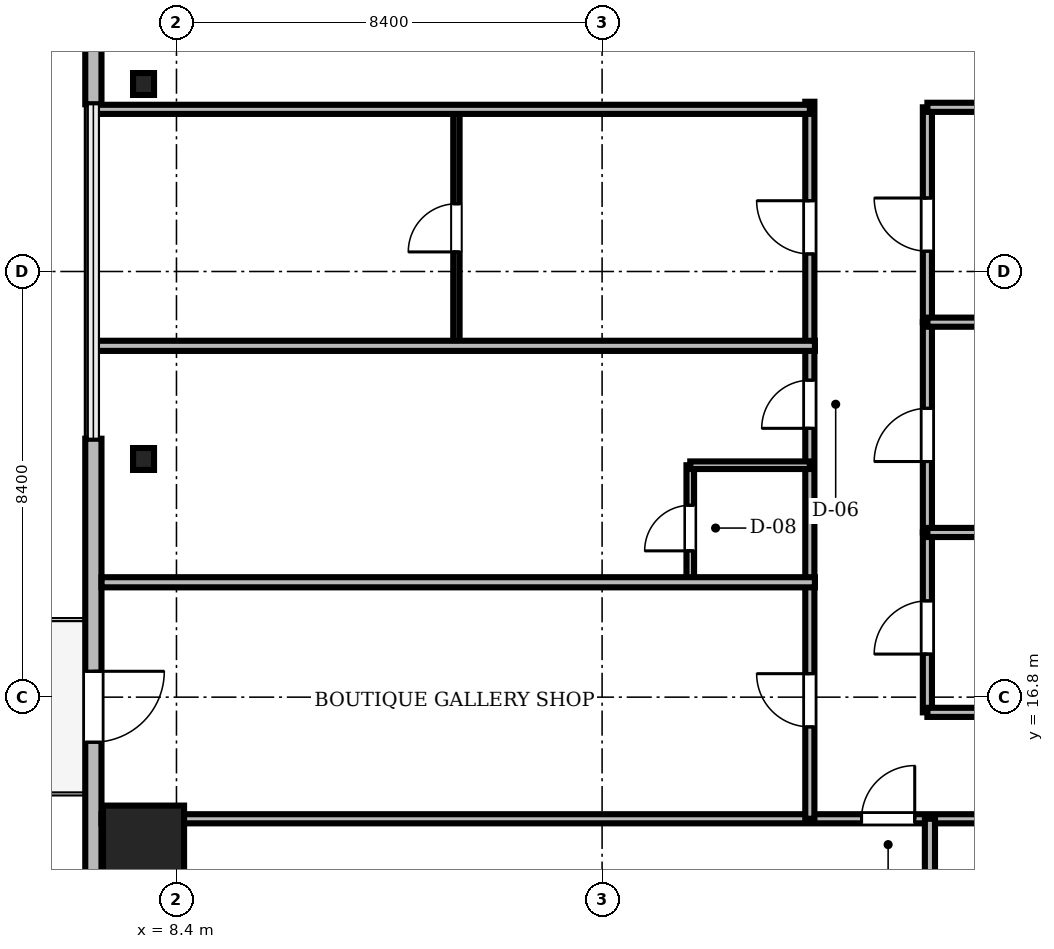
"""IFC4 building model, lengths in metres.
Left out: names, types, materials, properties, quantities, classifications, styles, units other than length and angle.
Written with IfcOpenShell. Run it as: python <this file> out.ifc"""

import sys

from ifc_helpers import new_model, si_unit, direction, frame, frame_2d, origin, origin_2d, place, context, subcontext, project, spatial, rectangle, i_section, extrude, source, transform, mapped, element, fill, save


model = new_model("IFC4")
c1 = context("Model", 3, precision=1e-05, world=origin(), true_north=direction((0.0, 1.0)))
c2 = subcontext(c1, "Body", "Model", "MODEL_VIEW")
j1 = project(units=[si_unit("LENGTHUNIT", "METRE"), si_unit("PLANEANGLEUNIT", "RADIAN")], contexts=[c1])
p1 = place(None, origin())
s1 = spatial("IfcSite", under=j1, at=p1, CompositionType="ELEMENT")
p2 = place(p1, origin())
s2 = spatial("IfcBuilding", under=s1, at=p2, CompositionType="ELEMENT")
p3 = place(p2, frame((0.0, 0.0, 137.2)))
s3 = spatial("IfcBuildingStorey", under=s2, at=p3, CompositionType="ELEMENT", Elevation=137.2)
m1 = source(origin(), c2, "Body", "SweptSolid", [
    extrude(rectangle(XDim=1.6, YDim=1.6, at=origin_2d()), origin(), (0.0, 0.0, 1.0), 3.46),
])
p4 = place(p3, frame((7.75, 13.86, 0.0), z_axis=(0.0, 0.0, 1.0), x_axis=(1.0, 0.0, 0.0)))
e1 = element("IfcColumn", 1, at=p4, inside=s3, PredefinedType="COLUMN", context=c2, shape_type="MappedRepresentation", body=[
    mapped(m1, transform((0.0, 0.0, 0.0), scale=1.0)),
])
m2 = source(origin(), c2, "Body", "SweptSolid", [
    extrude(i_section(OverallWidth=0.414, OverallDepth=0.432, WebThickness=0.026, FlangeThickness=0.04, FilletRadius=0.015, at=origin_2d()), origin(), (0.0, 0.0, 1.0), 3.46),
])
for number, where, z_axis, x_axis in (
    (2, (7.75, 28.9, 0.0), (0.0, 0.0, 1.0), (1.0, 0.0, 0.0)),
    (3, (7.75, 21.5, 0.0), (0.0, 0.0, 1.0), (1.0, 0.0, 0.0)),
):
    element("IfcColumn", number, at=place(p3, frame(where, z_axis=z_axis, x_axis=x_axis)), inside=s3, PredefinedType="COLUMN", context=c2, shape_type="MappedRepresentation", body=[
        mapped(m2, transform((0.0, 0.0, 0.0), scale=1.0)),
    ])
m3 = source(origin(), c2, "Body", "SweptSolid", [
    extrude(rectangle(XDim=15.6, YDim=0.32, at=frame_2d((7.8, 0.0))), origin(), (0.0, 0.0, 1.0), 3.46),
])
p5 = place(p3, frame((6.76, 44.1, 0.0), z_axis=(0.0, 0.0, 1.0), x_axis=(0.0, -1.0, 0.0)))
e4 = element("IfcWall", 4, at=p5, inside=s3, PredefinedType="SOLIDWALL", context=c2, shape_type="MappedRepresentation", body=[
    mapped(m3, transform((0.0, 0.0, 0.0), scale=1.0)),
])
m4 = source(origin(), c2, "Body", "SweptSolid", [
    extrude(rectangle(XDim=2.2, YDim=2.4, at=frame_2d((1.1, 1.2))), frame((0.0, 0.17, 0.0), z_axis=(0.0, -1.0, 0.0), x_axis=(1.0, 0.0, 0.0)), (0.0, 0.0, 1.0), 0.34),
])
p6 = place(p5, frame((3.005, 0.0, 0.72)))
e5 = element("IfcOpeningElement", 5, at=p6, cuts=e4, PredefinedType="OPENING", context=c2, shape_type="MappedRepresentation", body=[
    mapped(m4, transform((0.0, 0.0, 0.0), scale=1.0)),
])
m5 = source(origin(), c2, "Body", "SweptSolid", [
    extrude(rectangle(XDim=15.6, YDim=0.32, at=frame_2d((7.8, 0.0))), origin(), (0.0, 0.0, 1.0), 3.46),
])
p7 = place(p3, frame((6.76, 21.9, 0.0), z_axis=(0.0, 0.0, 1.0), x_axis=(0.0, -1.0, 0.0)))
e6 = element("IfcWall", 6, at=p7, inside=s3, PredefinedType="SOLIDWALL", context=c2, shape_type="MappedRepresentation", body=[
    mapped(m5, transform((0.0, 0.0, 0.0), scale=1.0)),
])
m6 = source(origin(), c2, "Body", "SweptSolid", [
    extrude(rectangle(XDim=1.4, YDim=2.3, at=frame_2d((0.7, 1.15))), frame((0.0, 0.17, 0.0), z_axis=(0.0, -1.0, 0.0), x_axis=(1.0, 0.0, 0.0)), (0.0, 0.0, 1.0), 0.34),
])
p8 = place(p7, frame((4.59, 0.0, 0.0)))
e7 = element("IfcOpeningElement", 7, at=p8, cuts=e6, PredefinedType="OPENING", context=c2, shape_type="MappedRepresentation", body=[
    mapped(m6, transform((0.0, 0.0, 0.0), scale=1.0)),
])
p9 = place(p7, frame((10.395, 0.0, 0.72)))
e8 = element("IfcOpeningElement", 8, at=p9, cuts=e6, PredefinedType="OPENING", context=c2, shape_type="MappedRepresentation", body=[
    mapped(m4, transform((0.0, 0.0, 0.0), scale=1.0)),
])
m7 = source(origin(), c2, "Body", "SweptSolid", [
    extrude(rectangle(XDim=46.156, YDim=0.18, at=frame_2d((23.078, 0.0))), origin(), (0.0, 0.0, 1.0), 2.702),
])
p10 = place(p3, frame((6.922, 14.4, 0.0), z_axis=(0.0, 0.0, 1.0), x_axis=(1.0, 0.0, 0.0)))
e9 = element("IfcWall", 9, at=p10, inside=s3, PredefinedType="PARTITIONING", context=c2, shape_type="MappedRepresentation", body=[
    mapped(m7, transform((0.0, 0.0, 0.0), scale=1.0)),
])
m8 = source(origin(), c2, "Body", "SweptSolid", [
    extrude(rectangle(XDim=1.05, YDim=2.2, at=frame_2d((0.525, 1.1))), frame((0.0, 0.1, 0.0), z_axis=(0.0, -1.0, 0.0), x_axis=(1.0, 0.0, 0.0)), (0.0, 0.0, 1.0), 0.2),
])
p11 = place(p10, frame((14.998, 0.0, 0.0)))
e10 = element("IfcOpeningElement", 10, at=p11, cuts=e9, PredefinedType="OPENING", context=c2, shape_type="MappedRepresentation", body=[
    mapped(m8, transform((0.0, 0.0, 0.0), scale=1.0)),
])
p12 = place(p10, frame((17.553, 0.0, 0.0)))
e11 = element("IfcOpeningElement", 11, at=p12, cuts=e9, PredefinedType="OPENING", context=c2, shape_type="MappedRepresentation", body=[
    mapped(m8, transform((0.0, 0.0, 0.0), scale=1.0)),
])
p13 = place(p10, frame((21.003, 0.0, 0.0)))
e12 = element("IfcOpeningElement", 12, at=p13, cuts=e9, PredefinedType="OPENING", context=c2, shape_type="MappedRepresentation", body=[
    mapped(m8, transform((0.0, 0.0, 0.0), scale=1.0)),
])
p14 = place(p10, frame((24.532, 0.0, 0.0)))
e13 = element("IfcOpeningElement", 13, at=p14, cuts=e9, PredefinedType="OPENING", context=c2, shape_type="MappedRepresentation", body=[
    mapped(m8, transform((0.0, 0.0, 0.0), scale=1.0)),
])
p15 = place(p10, frame((29.342, 0.0, 0.0)))
e14 = element("IfcOpeningElement", 14, at=p15, cuts=e9, PredefinedType="OPENING", context=c2, shape_type="MappedRepresentation", body=[
    mapped(m8, transform((0.0, 0.0, 0.0), scale=1.0)),
])
p16 = place(p10, frame((34.073, 0.0, 0.0)))
e15 = element("IfcOpeningElement", 15, at=p16, cuts=e9, PredefinedType="OPENING", context=c2, shape_type="MappedRepresentation", body=[
    mapped(m8, transform((0.0, 0.0, 0.0), scale=1.0)),
])
p17 = place(p10, frame((37.822, 0.0, 0.0)))
e16 = element("IfcOpeningElement", 16, at=p17, cuts=e9, PredefinedType="OPENING", context=c2, shape_type="MappedRepresentation", body=[
    mapped(m8, transform((0.0, 0.0, 0.0), scale=1.0)),
])
p18 = place(p10, frame((41.828, 0.0, 0.0)))
e17 = element("IfcOpeningElement", 17, at=p18, cuts=e9, PredefinedType="OPENING", context=c2, shape_type="MappedRepresentation", body=[
    mapped(m8, transform((0.0, 0.0, 0.0), scale=1.0)),
])
m9 = source(origin(), c2, "Body", "SweptSolid", [
    extrude(rectangle(XDim=14.15, YDim=0.18, at=frame_2d((7.075, 0.0))), origin(), (0.0, 0.0, 1.0), 2.852),
])
p19 = place(p3, frame((20.9, 14.4, 0.0), z_axis=(0.0, 0.0, 1.0), x_axis=(0.0, 1.0, 0.0)))
e18 = element("IfcWall", 18, at=p19, inside=s3, PredefinedType="PARTITIONING", context=c2, shape_type="MappedRepresentation", body=[
    mapped(m9, transform((0.0, 0.0, 0.0), scale=1.0)),
])
p20 = place(p19, frame((1.813, 0.0, 0.0)))
e19 = element("IfcOpeningElement", 19, at=p20, cuts=e18, PredefinedType="OPENING", context=c2, shape_type="MappedRepresentation", body=[
    mapped(m8, transform((0.0, 0.0, 0.0), scale=1.0)),
])
m10 = source(origin(), c2, "Body", "SweptSolid", [
    extrude(rectangle(XDim=0.95, YDim=2.15, at=frame_2d((0.475, 1.075))), frame((0.0, 0.1, 0.0), z_axis=(0.0, -1.0, 0.0), x_axis=(1.0, 0.0, 0.0)), (0.0, 0.0, 1.0), 0.2),
])
p21 = place(p19, frame((7.705, 0.0, 0.0)))
e20 = element("IfcOpeningElement", 20, at=p21, cuts=e18, PredefinedType="OPENING", context=c2, shape_type="MappedRepresentation", body=[
    mapped(m10, transform((0.0, 0.0, 0.0), scale=1.0)),
])
p22 = place(p19, frame((11.146, 0.0, 0.0)))
e21 = element("IfcOpeningElement", 21, at=p22, cuts=e18, PredefinedType="OPENING", context=c2, shape_type="MappedRepresentation", body=[
    mapped(m8, transform((0.0, 0.0, 0.0), scale=1.0)),
])
m11 = source(origin(), c2, "Body", "SweptSolid", [
    extrude(rectangle(XDim=4.667, YDim=0.125, at=frame_2d((2.333, 0.0))), origin(), (0.0, 0.0, 1.0), 2.852),
])
p23 = place(p3, frame((13.925, 23.733, 0.0), z_axis=(0.0, 0.0, 1.0), x_axis=(0.0, 1.0, 0.0)))
e22 = element("IfcWall", 22, at=p23, inside=s3, PredefinedType="PARTITIONING", context=c2, shape_type="MappedRepresentation", body=[
    mapped(m11, transform((0.0, 0.0, 0.0), scale=1.0)),
])
m12 = source(origin(), c2, "Body", "SweptSolid", [
    extrude(rectangle(XDim=0.95, YDim=2.15, at=frame_2d((0.475, 1.075))), frame((0.0, 0.073, 0.0), z_axis=(0.0, -1.0, 0.0), x_axis=(1.0, 0.0, 0.0)), (0.0, 0.0, 1.0), 0.145),
])
p24 = place(p23, frame((1.853, 0.0, 0.0)))
e23 = element("IfcOpeningElement", 23, at=p24, cuts=e22, PredefinedType="OPENING", context=c2, shape_type="MappedRepresentation", body=[
    mapped(m12, transform((0.0, 0.0, 0.0), scale=1.0)),
])
m13 = source(origin(), c2, "Body", "SweptSolid", [
    extrude(rectangle(XDim=4.24, YDim=0.18, at=frame_2d((2.12, 0.0))), origin(), (0.0, 0.0, 1.0), 2.852),
])
p25 = place(p3, frame((23.22, 24.2, 0.0), z_axis=(0.0, 0.0, 1.0), x_axis=(0.0, 1.0, 0.0)))
e24 = element("IfcWall", 24, at=p25, inside=s3, PredefinedType="PARTITIONING", context=c2, shape_type="MappedRepresentation", body=[
    mapped(m13, transform((0.0, 0.0, 0.0), scale=1.0)),
])
p26 = place(p25, frame((1.4, 0.0, 0.0)))
e25 = element("IfcOpeningElement", 25, at=p26, cuts=e24, PredefinedType="OPENING", context=c2, shape_type="MappedRepresentation", body=[
    mapped(m8, transform((0.0, 0.0, 0.0), scale=1.0)),
])
m14 = source(origin(), c2, "Body", "SweptSolid", [
    extrude(rectangle(XDim=4.15, YDim=0.18, at=frame_2d((2.075, 0.0))), origin(), (0.0, 0.0, 1.0), 3.122),
])
p27 = place(p3, frame((23.22, 20.05, 0.0), z_axis=(0.0, 0.0, 1.0), x_axis=(0.0, 1.0, 0.0)))
e26 = element("IfcWall", 26, at=p27, inside=s3, PredefinedType="PARTITIONING", context=c2, shape_type="MappedRepresentation", body=[
    mapped(m14, transform((0.0, 0.0, 0.0), scale=1.0)),
])
p28 = place(p27, frame((1.4, 0.0, 0.0)))
e27 = element("IfcOpeningElement", 27, at=p28, cuts=e26, PredefinedType="OPENING", context=c2, shape_type="MappedRepresentation", body=[
    mapped(m8, transform((0.0, 0.0, 0.0), scale=1.0)),
])
m15 = source(origin(), c2, "Body", "SweptSolid", [
    extrude(rectangle(XDim=3.55, YDim=0.18, at=frame_2d((1.775, 0.0))), origin(), (0.0, 0.0, 1.0), 2.852),
])
p29 = place(p3, frame((23.22, 16.5, 0.0), z_axis=(0.0, 0.0, 1.0), x_axis=(0.0, 1.0, 0.0)))
e28 = element("IfcWall", 28, at=p29, inside=s3, PredefinedType="PARTITIONING", context=c2, shape_type="MappedRepresentation", body=[
    mapped(m15, transform((0.0, 0.0, 0.0), scale=1.0)),
])
p30 = place(p29, frame((1.15, 0.0, 0.0)))
e29 = element("IfcOpeningElement", 29, at=p30, cuts=e28, PredefinedType="OPENING", context=c2, shape_type="MappedRepresentation", body=[
    mapped(m8, transform((0.0, 0.0, 0.0), scale=1.0)),
])
m16 = source(origin(), c2, "Body", "SweptSolid", [
    extrude(rectangle(XDim=2.29, YDim=0.15, at=frame_2d((1.145, 0.0))), origin(), (0.0, 0.0, 1.0), 2.852),
])
p31 = place(p3, frame((18.54, 19.087, 0.0), z_axis=(0.0, 0.0, 1.0), x_axis=(0.0, 1.0, 0.0)))
e30 = element("IfcWall", 30, at=p31, inside=s3, PredefinedType="PARTITIONING", context=c2, shape_type="MappedRepresentation", body=[
    mapped(m16, transform((0.0, 0.0, 0.0), scale=1.0)),
])
m17 = source(origin(), c2, "Body", "SweptSolid", [
    extrude(rectangle(XDim=0.9, YDim=2.1, at=frame_2d((0.45, 1.05))), frame((0.0, 0.085, 0.0), z_axis=(0.0, -1.0, 0.0), x_axis=(1.0, 0.0, 0.0)), (0.0, 0.0, 1.0), 0.17),
])
p32 = place(p31, frame((0.6, 0.0, 0.0)))
e31 = element("IfcOpeningElement", 31, at=p32, cuts=e30, PredefinedType="OPENING", context=c2, shape_type="MappedRepresentation", body=[
    mapped(m17, transform((0.0, 0.0, 0.0), scale=1.0)),
])
m18 = source(origin(), c2, "Body", "SweptSolid", [
    extrude(rectangle(XDim=14.078, YDim=0.2, at=frame_2d((7.039, 0.0))), origin(), (0.0, 0.0, 1.0), 2.702),
])
p33 = place(p3, frame((6.922, 19.067, 0.0), z_axis=(0.0, 0.0, 1.0), x_axis=(1.0, 0.0, 0.0)))
e32 = element("IfcWall", 32, at=p33, inside=s3, PredefinedType="PARTITIONING", context=c2, shape_type="MappedRepresentation", body=[
    mapped(m18, transform((0.0, 0.0, 0.0), scale=1.0)),
])
m19 = source(origin(), c2, "Body", "SweptSolid", [
    extrude(rectangle(XDim=14.27, YDim=0.2, at=frame_2d((7.135, 0.0))), origin(), (0.0, 0.0, 1.0), 2.702),
])
p34 = place(p3, frame((6.73, 23.733, 0.0), z_axis=(0.0, 0.0, 1.0), x_axis=(1.0, 0.0, 0.0)))
e33 = element("IfcWall", 33, at=p34, inside=s3, PredefinedType="PARTITIONING", context=c2, shape_type="MappedRepresentation", body=[
    mapped(m19, transform((0.0, 0.0, 0.0), scale=1.0)),
])
m20 = source(origin(), c2, "Body", "SweptSolid", [
    extrude(rectangle(XDim=14.17, YDim=0.18, at=frame_2d((7.085, 0.0))), origin(), (0.0, 0.0, 1.0), 2.702),
])
p35 = place(p3, frame((6.73, 28.4, 0.0), z_axis=(0.0, 0.0, 1.0), x_axis=(1.0, 0.0, 0.0)))
e34 = element("IfcWall", 34, at=p35, inside=s3, PredefinedType="PARTITIONING", context=c2, shape_type="MappedRepresentation", body=[
    mapped(m20, transform((0.0, 0.0, 0.0), scale=1.0)),
])
m21 = source(origin(), c2, "Body", "SweptSolid", [
    extrude(rectangle(XDim=12.278, YDim=0.2, at=frame_2d((6.139, 0.0))), origin(), (0.0, 0.0, 1.0), 2.702),
])
p36 = place(p3, frame((23.27, 2.122, 0.0), z_axis=(0.0, 0.0, 1.0), x_axis=(0.0, 1.0, 0.0)))
e35 = element("IfcWall", 35, at=p36, inside=s3, PredefinedType="PARTITIONING", context=c2, shape_type="MappedRepresentation", body=[
    mapped(m21, transform((0.0, 0.0, 0.0), scale=1.0)),
])
m22 = source(origin(), c2, "Body", "SweptSolid", [
    extrude(rectangle(XDim=5.18, YDim=0.18, at=frame_2d((2.59, 0.0))), origin(), (0.0, 0.0, 1.0), 3.46),
])
for number, where, z_axis, x_axis in (
    (36, (23.22, 16.5, 0.0), (0.0, 0.0, 1.0), (1.0, 0.0, 0.0)),
    (37, (23.22, 20.05, 0.0), (0.0, 0.0, 1.0), (1.0, 0.0, 0.0)),
    (38, (23.22, 24.2, 0.0), (0.0, 0.0, 1.0), (1.0, 0.0, 0.0)),
    (39, (23.22, 28.44, 0.0), (0.0, 0.0, 1.0), (1.0, 0.0, 0.0)),
):
    element("IfcWall", number, at=place(p3, frame(where, z_axis=z_axis, x_axis=x_axis)), inside=s3, PredefinedType="PARTITIONING", context=c2, shape_type="MappedRepresentation", body=[
        mapped(m22, transform((0.0, 0.0, 0.0), scale=1.0)),
    ])
m23 = source(origin(), c2, "Body", "SweptSolid", [
    extrude(rectangle(XDim=2.36, YDim=0.15, at=frame_2d((1.18, 0.0))), origin(), (0.0, 0.0, 1.0), 3.46),
])
p37 = place(p3, frame((18.54, 21.377, 0.0), z_axis=(0.0, 0.0, 1.0), x_axis=(1.0, 0.0, 0.0)))
e40 = element("IfcWall", 40, at=p37, inside=s3, PredefinedType="PARTITIONING", context=c2, shape_type="MappedRepresentation", body=[
    mapped(m23, transform((0.0, 0.0, 0.0), scale=1.0)),
])
m24 = source(origin(), c2, "Body", "SweptSolid", [
    extrude(rectangle(XDim=1.4, YDim=2.3, at=frame_2d((0.7, 1.15))), frame((0.0, 0.025, 0.0), z_axis=(0.0, -1.0, 0.0), x_axis=(1.0, 0.0, 0.0)), (0.0, 0.0, 1.0), 0.05),
])
p38 = place(p8, frame((1.4, 0.0, 0.0), z_axis=(0.0, 0.0, 1.0), x_axis=(-1.0, 0.0, 0.0)))
e41 = element("IfcDoor", 41, at=p38, inside=s3, OperationType="DOUBLE_DOOR_SLIDING", PredefinedType="DOOR", context=c2, shape_type="MappedRepresentation", body=[
    mapped(m24, transform((0.0, 0.0, 0.0), scale=1.0)),
])
fill(e7, e41)
m25 = source(origin(), c2, "Body", "SweptSolid", [
    extrude(rectangle(XDim=1.05, YDim=2.2, at=frame_2d((0.525, 1.1))), frame((0.0, 0.025, 0.0), z_axis=(0.0, -1.0, 0.0), x_axis=(1.0, 0.0, 0.0)), (0.0, 0.0, 1.0), 0.05),
])
p39 = place(p11, origin())
e42 = element("IfcDoor", 42, at=p39, inside=s3, OperationType="SINGLE_SWING_RIGHT", PredefinedType="DOOR", context=c2, shape_type="MappedRepresentation", body=[
    mapped(m25, transform((0.0, 0.0, 0.0), scale=1.0)),
])
fill(e10, e42)
p40 = place(p20, origin())
e43 = element("IfcDoor", 43, at=p40, inside=s3, OperationType="SINGLE_SWING_RIGHT", PredefinedType="DOOR", context=c2, shape_type="MappedRepresentation", body=[
    mapped(m25, transform((0.0, 0.0, 0.0), scale=1.0)),
])
fill(e19, e43)
m26 = source(origin(), c2, "Body", "SweptSolid", [
    extrude(rectangle(XDim=0.95, YDim=2.15, at=frame_2d((0.475, 1.075))), frame((0.0, 0.025, 0.0), z_axis=(0.0, -1.0, 0.0), x_axis=(1.0, 0.0, 0.0)), (0.0, 0.0, 1.0), 0.05),
])
p41 = place(p21, origin())
e44 = element("IfcDoor", 44, at=p41, inside=s3, OperationType="SINGLE_SWING_LEFT", PredefinedType="DOOR", context=c2, shape_type="MappedRepresentation", body=[
    mapped(m26, transform((0.0, 0.0, 0.0), scale=1.0)),
])
fill(e20, e44)
p42 = place(p22, origin())
e45 = element("IfcDoor", 45, at=p42, inside=s3, OperationType="SINGLE_SWING_RIGHT", PredefinedType="DOOR", context=c2, shape_type="MappedRepresentation", body=[
    mapped(m25, transform((0.0, 0.0, 0.0), scale=1.0)),
])
fill(e21, e45)
p43 = place(p24, origin())
e46 = element("IfcDoor", 46, at=p43, inside=s3, OperationType="SINGLE_SWING_LEFT", PredefinedType="DOOR", context=c2, shape_type="MappedRepresentation", body=[
    mapped(m26, transform((0.0, 0.0, 0.0), scale=1.0)),
])
fill(e23, e46)
p44 = place(p26, origin())
e47 = element("IfcDoor", 47, at=p44, inside=s3, OperationType="SINGLE_SWING_RIGHT", PredefinedType="DOOR", context=c2, shape_type="MappedRepresentation", body=[
    mapped(m25, transform((0.0, 0.0, 0.0), scale=1.0)),
])
fill(e25, e47)
p45 = place(p28, origin())
e48 = element("IfcDoor", 48, at=p45, inside=s3, OperationType="SINGLE_SWING_LEFT", PredefinedType="DOOR", context=c2, shape_type="MappedRepresentation", body=[
    mapped(m25, transform((0.0, 0.0, 0.0), scale=1.0)),
])
fill(e27, e48)
p46 = place(p30, origin())
e49 = element("IfcDoor", 49, at=p46, inside=s3, OperationType="SINGLE_SWING_LEFT", PredefinedType="DOOR", context=c2, shape_type="MappedRepresentation", body=[
    mapped(m25, transform((0.0, 0.0, 0.0), scale=1.0)),
])
fill(e29, e49)
m27 = source(origin(), c2, "Body", "SweptSolid", [
    extrude(rectangle(XDim=0.9, YDim=2.1, at=frame_2d((0.45, 1.05))), frame((0.0, 0.025, 0.0), z_axis=(0.0, -1.0, 0.0), x_axis=(1.0, 0.0, 0.0)), (0.0, 0.0, 1.0), 0.05),
])
p47 = place(p32, origin())
e50 = element("IfcDoor", 50, at=p47, inside=s3, OperationType="SINGLE_SWING_LEFT", PredefinedType="DOOR", context=c2, shape_type="MappedRepresentation", body=[
    mapped(m27, transform((0.0, 0.0, 0.0), scale=1.0)),
])
fill(e31, e50)
save(model, sys.argv[1])
